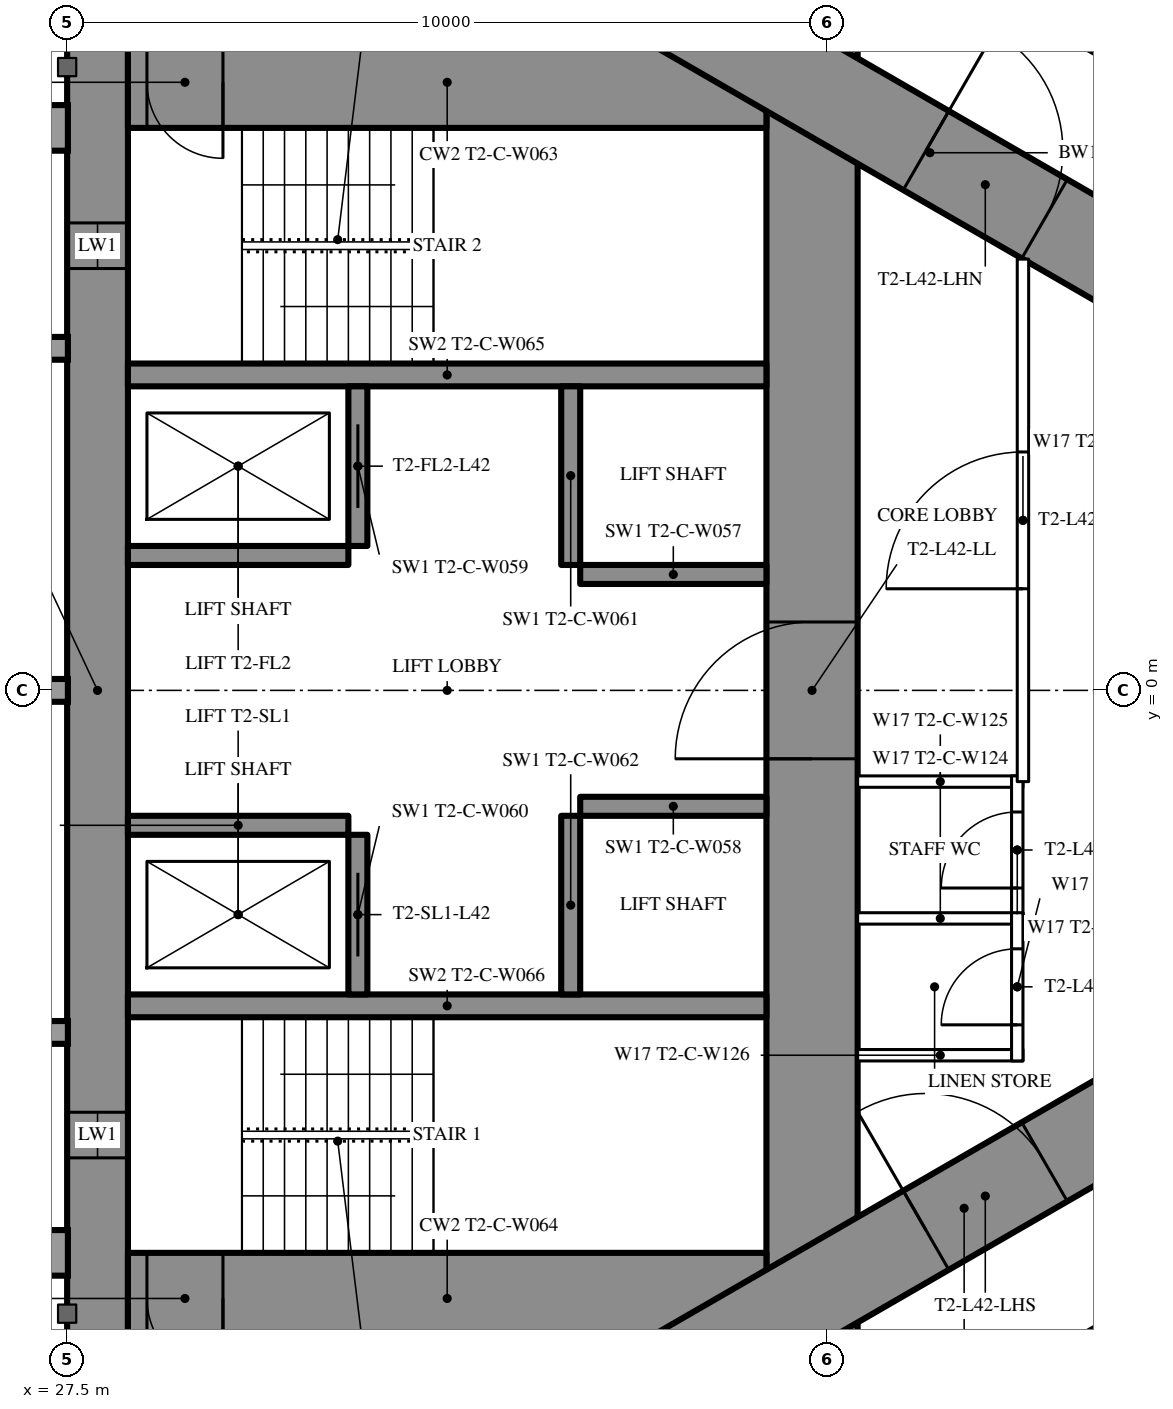
"""IFC4 building model, lengths in metres.
Left out: names, types, materials, properties, quantities, classifications, styles, units other than length and angle.
Written with IfcOpenShell. Run it as: python <this file> out.ifc"""

import sys

from ifc_helpers import new_model, si_unit, direction, frame, frame_2d, origin, place, context, subcontext, project, spatial, rectangle, extrude, element, fill, save


model = new_model("IFC4")
c1 = context("Model", 3, precision=1e-05, world=origin(), true_north=direction((0.0, 1.0)))
c2 = subcontext(c1, "Body", "Model", "MODEL_VIEW")
j1 = project(units=[si_unit("LENGTHUNIT", "METRE"), si_unit("PLANEANGLEUNIT", "RADIAN")], contexts=[c1])
p1 = place(None, origin())
s1 = spatial("IfcSite", under=j1, at=p1, CompositionType="ELEMENT")
p2 = place(p1, origin())
s2 = spatial("IfcBuilding", under=s1, at=p2, CompositionType="ELEMENT")
p3 = place(p2, frame((0.0, 0.0, 159.8)))
s3 = spatial("IfcBuildingStorey", under=s2, at=p3, CompositionType="ELEMENT", Elevation=159.8)
p4 = place(p3, frame((27.9, -8.6, 0.0), z_axis=(0.0, 0.0, 1.0), x_axis=(0.0, 1.0, 0.0)))
e1 = element("IfcWall", 1, at=p4, inside=s3, PredefinedType="SHEAR", context=c2, shape_type="SweptSolid", body=[
    extrude(rectangle(XDim=17.2, YDim=0.8, at=frame_2d((8.6, 0.0))), origin(), (0.0, 0.0, 1.0), 3.5),
])
p5 = place(p4, frame((2.45, 0.0, 0.6)))
e2 = element("IfcOpeningElement", 2, at=p5, cuts=e1, PredefinedType="OPENING", context=c2, shape_type="SweptSolid", body=[
    extrude(rectangle(XDim=0.6, YDim=2.1, at=frame_2d((0.3, 1.05))), frame((0.0, 0.41, 0.0), z_axis=(0.0, -1.0, 0.0), x_axis=(1.0, 0.0, 0.0)), (0.0, 0.0, 1.0), 0.82),
])
p6 = place(p4, frame((14.15, 0.0, 0.6)))
e3 = element("IfcOpeningElement", 3, at=p6, cuts=e1, PredefinedType="OPENING", context=c2, shape_type="SweptSolid", body=[
    extrude(rectangle(XDim=0.6, YDim=2.1, at=frame_2d((0.3, 1.05))), frame((0.0, 0.41, 0.0), z_axis=(0.0, -1.0, 0.0), x_axis=(1.0, 0.0, 0.0)), (0.0, 0.0, 1.0), 0.82),
])
p7 = place(p3, frame((37.3, -8.6, 0.0), z_axis=(0.0, 0.0, 1.0), x_axis=(0.0, 1.0, 0.0)))
e4 = element("IfcWall", 4, at=p7, inside=s3, PredefinedType="SHEAR", context=c2, shape_type="SweptSolid", body=[
    extrude(rectangle(XDim=17.2, YDim=1.2, at=frame_2d((8.6, 0.0))), origin(), (0.0, 0.0, 1.0), 3.5),
])
p8 = place(p7, frame((7.7, 0.0, 0.0)))
e5 = element("IfcOpeningElement", 5, at=p8, cuts=e4, PredefinedType="OPENING", context=c2, shape_type="SweptSolid", body=[
    extrude(rectangle(XDim=1.8, YDim=2.2, at=frame_2d((0.9, 1.1))), frame((0.0, 0.61, 0.0), z_axis=(0.0, -1.0, 0.0), x_axis=(1.0, 0.0, 0.0)), (0.0, 0.0, 1.0), 1.22),
])
p9 = place(p3, frame((28.3, -8.0, 0.0), z_axis=(0.0, 0.0, 1.0), x_axis=(1.0, 0.0, 0.0)))
e6 = element("IfcWall", 6, at=p9, inside=s3, PredefinedType="SHEAR", context=c2, shape_type="SweptSolid", body=[
    extrude(rectangle(XDim=8.4, YDim=1.2, at=frame_2d((4.2, 0.0))), origin(), (0.0, 0.0, 1.0), 3.5),
])
p10 = place(p9, frame((0.25, 0.0, 0.0)))
e7 = element("IfcOpeningElement", 7, at=p10, cuts=e6, PredefinedType="OPENING", context=c2, shape_type="SweptSolid", body=[
    extrude(rectangle(XDim=1.0, YDim=2.2, at=frame_2d((0.5, 1.1))), frame((0.0, 0.61, 0.0), z_axis=(0.0, -1.0, 0.0), x_axis=(1.0, 0.0, 0.0)), (0.0, 0.0, 1.0), 1.22),
])
p11 = place(p3, frame((28.3, 8.0, 0.0), z_axis=(0.0, 0.0, 1.0), x_axis=(1.0, 0.0, 0.0)))
e8 = element("IfcWall", 8, at=p11, inside=s3, PredefinedType="SHEAR", context=c2, shape_type="SweptSolid", body=[
    extrude(rectangle(XDim=8.4, YDim=1.2, at=frame_2d((4.2, 0.0))), origin(), (0.0, 0.0, 1.0), 3.5),
])
p12 = place(p11, frame((0.25, 0.0, 0.0)))
e9 = element("IfcOpeningElement", 9, at=p12, cuts=e8, PredefinedType="OPENING", context=c2, shape_type="SweptSolid", body=[
    extrude(rectangle(XDim=1.0, YDim=2.2, at=frame_2d((0.5, 1.1))), frame((0.0, 0.61, 0.0), z_axis=(0.0, -1.0, 0.0), x_axis=(1.0, 0.0, 0.0)), (0.0, 0.0, 1.0), 1.22),
])
for number, where, z_axis, x_axis in (
    (10, (28.3, -4.15, 0.0), (0.0, 0.0, 1.0), (1.0, 0.0, 0.0)),
    (11, (28.3, 4.15, 0.0), (0.0, 0.0, 1.0), (1.0, 0.0, 0.0)),
):
    element("IfcWall", number, at=place(p3, frame(where, z_axis=z_axis, x_axis=x_axis)), inside=s3, PredefinedType="SHEAR", context=c2, shape_type="SweptSolid", body=[
        extrude(rectangle(XDim=8.4, YDim=0.3, at=frame_2d((4.2, 0.0))), origin(), (0.0, 0.0, 1.0), 3.5),
    ])
p13 = place(p3, frame((31.325, -4.0, 0.0), z_axis=(0.0, 0.0, 1.0), x_axis=(0.0, 1.0, 0.0)))
e12 = element("IfcWall", 12, at=p13, inside=s3, PredefinedType="SHEAR", context=c2, shape_type="SweptSolid", body=[
    extrude(rectangle(XDim=2.1, YDim=0.25, at=frame_2d((1.05, 0.0))), origin(), (0.0, 0.0, 1.0), 3.5),
])
p14 = place(p13, frame((0.5, 0.0, 0.0)))
e13 = element("IfcOpeningElement", 13, at=p14, cuts=e12, PredefinedType="OPENING", context=c2, shape_type="SweptSolid", body=[
    extrude(rectangle(XDim=1.1, YDim=2.2, at=frame_2d((0.55, 1.1))), frame((0.0, 0.135, 0.0), z_axis=(0.0, -1.0, 0.0), x_axis=(1.0, 0.0, 0.0)), (0.0, 0.0, 1.0), 0.27),
])
p15 = place(p3, frame((34.125, -4.0, 0.0), z_axis=(0.0, 0.0, 1.0), x_axis=(0.0, 1.0, 0.0)))
e14 = element("IfcWall", 14, at=p15, inside=s3, PredefinedType="SHEAR", context=c2, shape_type="SweptSolid", body=[
    extrude(rectangle(XDim=2.35, YDim=0.25, at=frame_2d((1.175, 0.0))), origin(), (0.0, 0.0, 1.0), 3.5),
])
p16 = place(p3, frame((28.3, -1.775, 0.0), z_axis=(0.0, 0.0, 1.0), x_axis=(1.0, 0.0, 0.0)))
e15 = element("IfcWall", 15, at=p16, inside=s3, PredefinedType="SHEAR", context=c2, shape_type="SweptSolid", body=[
    extrude(rectangle(XDim=2.9, YDim=0.25, at=frame_2d((1.45, 0.0))), origin(), (0.0, 0.0, 1.0), 3.5),
])
p17 = place(p3, frame((34.25, -1.525, 0.0), z_axis=(0.0, 0.0, 1.0), x_axis=(1.0, 0.0, 0.0)))
e16 = element("IfcWall", 16, at=p17, inside=s3, PredefinedType="SHEAR", context=c2, shape_type="SweptSolid", body=[
    extrude(rectangle(XDim=2.45, YDim=0.25, at=frame_2d((1.225, 0.0))), origin(), (0.0, 0.0, 1.0), 3.5),
])
p18 = place(p3, frame((31.325, 1.9, 0.0), z_axis=(0.0, 0.0, 1.0), x_axis=(0.0, 1.0, 0.0)))
e17 = element("IfcWall", 17, at=p18, inside=s3, PredefinedType="SHEAR", context=c2, shape_type="SweptSolid", body=[
    extrude(rectangle(XDim=2.1, YDim=0.25, at=frame_2d((1.05, 0.0))), origin(), (0.0, 0.0, 1.0), 3.5),
])
p19 = place(p18, frame((0.5, 0.0, 0.0)))
e18 = element("IfcOpeningElement", 18, at=p19, cuts=e17, PredefinedType="OPENING", context=c2, shape_type="SweptSolid", body=[
    extrude(rectangle(XDim=1.1, YDim=2.2, at=frame_2d((0.55, 1.1))), frame((0.0, 0.135, 0.0), z_axis=(0.0, -1.0, 0.0), x_axis=(1.0, 0.0, 0.0)), (0.0, 0.0, 1.0), 0.27),
])
p20 = place(p3, frame((34.125, 1.65, 0.0), z_axis=(0.0, 0.0, 1.0), x_axis=(0.0, 1.0, 0.0)))
e19 = element("IfcWall", 19, at=p20, inside=s3, PredefinedType="SHEAR", context=c2, shape_type="SweptSolid", body=[
    extrude(rectangle(XDim=2.35, YDim=0.25, at=frame_2d((1.175, 0.0))), origin(), (0.0, 0.0, 1.0), 3.5),
])
p21 = place(p3, frame((28.3, 1.775, 0.0), z_axis=(0.0, 0.0, 1.0), x_axis=(1.0, 0.0, 0.0)))
e20 = element("IfcWall", 20, at=p21, inside=s3, PredefinedType="SHEAR", context=c2, shape_type="SweptSolid", body=[
    extrude(rectangle(XDim=2.9, YDim=0.25, at=frame_2d((1.45, 0.0))), origin(), (0.0, 0.0, 1.0), 3.5),
])
p22 = place(p3, frame((34.25, 1.525, 0.0), z_axis=(0.0, 0.0, 1.0), x_axis=(1.0, 0.0, 0.0)))
e21 = element("IfcWall", 21, at=p22, inside=s3, PredefinedType="SHEAR", context=c2, shape_type="SweptSolid", body=[
    extrude(rectangle(XDim=2.45, YDim=0.25, at=frame_2d((1.225, 0.0))), origin(), (0.0, 0.0, 1.0), 3.5),
])
p23 = place(p3, frame((27.2, -13.8, 0.0), z_axis=(0.0, 0.0, 1.0), x_axis=(0.866027159892, 0.499996958321, 0.0)))
e22 = element("IfcWall", 22, at=p23, inside=s3, PredefinedType="SHEAR", context=c2, shape_type="SweptSolid", body=[
    extrude(rectangle(XDim=27.947, YDim=1.2, at=frame_2d((13.973, 0.0))), origin(), (0.0, 0.0, 1.0), 3.5),
])
p24 = place(p23, frame((4.6, 0.0, 0.0)))
e23 = element("IfcOpeningElement", 23, at=p24, cuts=e22, PredefinedType="OPENING", context=c2, shape_type="SweptSolid", body=[
    extrude(rectangle(XDim=1.0, YDim=2.2, at=frame_2d((0.5, 1.1))), frame((0.0, 0.61, 0.0), z_axis=(0.0, -1.0, 0.0), x_axis=(1.0, 0.0, 0.0)), (0.0, 0.0, 1.0), 1.22),
])
p25 = place(p23, frame((13.395, 0.0, 0.0)))
e24 = element("IfcOpeningElement", 24, at=p25, cuts=e22, PredefinedType="OPENING", context=c2, shape_type="SweptSolid", body=[
    extrude(rectangle(XDim=1.8, YDim=2.2, at=frame_2d((0.9, 1.1))), frame((0.0, 0.61, 0.0), z_axis=(0.0, -1.0, 0.0), x_axis=(1.0, 0.0, 0.0)), (0.0, 0.0, 1.0), 1.22),
])
p26 = place(p3, frame((27.2, 13.8, 0.0), z_axis=(0.0, 0.0, 1.0), x_axis=(0.866024515034, -0.500001539357, 0.0)))
e25 = element("IfcWall", 25, at=p26, inside=s3, PredefinedType="SHEAR", context=c2, shape_type="SweptSolid", body=[
    extrude(rectangle(XDim=26.907, YDim=1.2, at=frame_2d((13.454, 0.0))), origin(), (0.0, 0.0, 1.0), 3.5),
])
p27 = place(p26, frame((4.6, 0.0, 0.0)))
e26 = element("IfcOpeningElement", 26, at=p27, cuts=e25, PredefinedType="OPENING", context=c2, shape_type="SweptSolid", body=[
    extrude(rectangle(XDim=1.0, YDim=2.2, at=frame_2d((0.5, 1.1))), frame((0.0, 0.61, 0.0), z_axis=(0.0, -1.0, 0.0), x_axis=(1.0, 0.0, 0.0)), (0.0, 0.0, 1.0), 1.22),
])
p28 = place(p26, frame((13.395, 0.0, 0.0)))
e27 = element("IfcOpeningElement", 27, at=p28, cuts=e25, PredefinedType="OPENING", context=c2, shape_type="SweptSolid", body=[
    extrude(rectangle(XDim=1.8, YDim=2.2, at=frame_2d((0.9, 1.1))), frame((0.0, 0.61, 0.0), z_axis=(0.0, -1.0, 0.0), x_axis=(1.0, 0.0, 0.0)), (0.0, 0.0, 1.0), 1.22),
])
p29 = place(p3, frame((36.834, 10.894, 0.0), z_axis=(0.0, 0.0, 1.0), x_axis=(0.866031655879, -0.499989170898, 0.0)))
e28 = element("IfcWall", 28, at=p29, inside=s3, PredefinedType="PARTITIONING", context=c2, shape_type="SweptSolid", body=[
    extrude(rectangle(XDim=11.41, YDim=0.2, at=frame_2d((5.705, 0.0))), origin(), (0.0, 0.0, 1.0), 3.25),
])
p30 = place(p29, frame((5.144, 0.0, 0.0)))
e29 = element("IfcOpeningElement", 29, at=p30, cuts=e28, PredefinedType="OPENING", context=c2, shape_type="SweptSolid", body=[
    extrude(rectangle(XDim=0.95, YDim=2.2, at=frame_2d((0.475, 1.1))), frame((0.0, 0.11, 0.0), z_axis=(0.0, -1.0, 0.0), x_axis=(1.0, 0.0, 0.0)), (0.0, 0.0, 1.0), 0.22),
])
p31 = place(p29, frame((3.161, 0.0, 0.0)))
e30 = element("IfcOpeningElement", 30, at=p31, cuts=e28, PredefinedType="OPENING", context=c2, shape_type="SweptSolid", body=[
    extrude(rectangle(XDim=0.95, YDim=2.2, at=frame_2d((0.475, 1.1))), frame((0.0, 0.11, 0.0), z_axis=(0.0, -1.0, 0.0), x_axis=(1.0, 0.0, 0.0)), (0.0, 0.0, 1.0), 0.22),
])
p32 = place(p29, frame((9.102, 0.0, 0.0)))
e31 = element("IfcOpeningElement", 31, at=p32, cuts=e28, PredefinedType="OPENING", context=c2, shape_type="SweptSolid", body=[
    extrude(rectangle(XDim=1.8, YDim=2.2, at=frame_2d((0.9, 1.1))), frame((0.0, 0.11, 0.0), z_axis=(0.0, -1.0, 0.0), x_axis=(1.0, 0.0, 0.0)), (0.0, 0.0, 1.0), 0.22),
])
p33 = place(p3, frame((40.741, -8.638, 0.0), z_axis=(0.0, 0.0, 1.0), x_axis=(0.866022967338, 0.500004220025, 0.0)))
e32 = element("IfcWall", 32, at=p33, inside=s3, PredefinedType="PARTITIONING", context=c2, shape_type="SweptSolid", body=[
    extrude(rectangle(XDim=17.276, YDim=0.2, at=frame_2d((8.638, 0.0))), origin(), (0.0, 0.0, 1.0), 3.25),
])
p34 = place(p33, frame((7.316, 0.0, 0.0)))
e33 = element("IfcOpeningElement", 33, at=p34, cuts=e32, PredefinedType="OPENING", context=c2, shape_type="SweptSolid", body=[
    extrude(rectangle(XDim=0.95, YDim=2.2, at=frame_2d((0.475, 1.1))), frame((0.0, 0.11, 0.0), z_axis=(0.0, -1.0, 0.0), x_axis=(1.0, 0.0, 0.0)), (0.0, 0.0, 1.0), 0.22),
])
p35 = place(p33, frame((11.366, 0.0, 0.0)))
e34 = element("IfcOpeningElement", 34, at=p35, cuts=e32, PredefinedType="OPENING", context=c2, shape_type="SweptSolid", body=[
    extrude(rectangle(XDim=0.95, YDim=2.2, at=frame_2d((0.475, 1.1))), frame((0.0, 0.11, 0.0), z_axis=(0.0, -1.0, 0.0), x_axis=(1.0, 0.0, 0.0)), (0.0, 0.0, 1.0), 0.22),
])
p36 = place(p33, frame((13.347, 0.0, 0.0)))
e35 = element("IfcOpeningElement", 35, at=p36, cuts=e32, PredefinedType="OPENING", context=c2, shape_type="SweptSolid", body=[
    extrude(rectangle(XDim=0.95, YDim=2.2, at=frame_2d((0.475, 1.1))), frame((0.0, 0.11, 0.0), z_axis=(0.0, -1.0, 0.0), x_axis=(1.0, 0.0, 0.0)), (0.0, 0.0, 1.0), 0.22),
])
for number, where, z_axis, x_axis in (
    (36, (37.9, -1.2, 0.0), (0.0, 0.0, 1.0), (1.0, 0.0, 0.0)),
    (37, (37.9, -3.0, 0.0), (0.0, 0.0, 1.0), (1.0, 0.0, 0.0)),
    (38, (37.9, -4.8, 0.0), (0.0, 0.0, 1.0), (1.0, 0.0, 0.0)),
):
    element("IfcWall", number, at=place(p3, frame(where, z_axis=z_axis, x_axis=x_axis)), inside=s3, PredefinedType="PARTITIONING", context=c2, shape_type="SweptSolid", body=[
        extrude(rectangle(XDim=2.175, YDim=0.15, at=frame_2d((1.087, 0.0))), origin(), (0.0, 0.0, 1.0), 3.25),
    ])
p37 = place(p3, frame((40.0, -3.075, 0.0), z_axis=(0.0, 0.0, 1.0), x_axis=(0.0, 1.0, 0.0)))
e39 = element("IfcWall", 39, at=p37, inside=s3, PredefinedType="PARTITIONING", context=c2, shape_type="SweptSolid", body=[
    extrude(rectangle(XDim=1.95, YDim=0.15, at=frame_2d((0.975, 0.0))), origin(), (0.0, 0.0, 1.0), 3.25),
])
p38 = place(p37, frame((0.475, 0.0, 0.0)))
e40 = element("IfcOpeningElement", 40, at=p38, cuts=e39, PredefinedType="OPENING", context=c2, shape_type="SweptSolid", body=[
    extrude(rectangle(XDim=1.0, YDim=2.2, at=frame_2d((0.5, 1.1))), frame((0.0, 0.085, 0.0), z_axis=(0.0, -1.0, 0.0), x_axis=(1.0, 0.0, 0.0)), (0.0, 0.0, 1.0), 0.17),
])
p39 = place(p3, frame((40.0, -4.875, 0.0), z_axis=(0.0, 0.0, 1.0), x_axis=(0.0, 1.0, 0.0)))
e41 = element("IfcWall", 41, at=p39, inside=s3, PredefinedType="PARTITIONING", context=c2, shape_type="SweptSolid", body=[
    extrude(rectangle(XDim=1.95, YDim=0.15, at=frame_2d((0.975, 0.0))), origin(), (0.0, 0.0, 1.0), 3.25),
])
p40 = place(p39, frame((0.475, 0.0, 0.0)))
e42 = element("IfcOpeningElement", 42, at=p40, cuts=e41, PredefinedType="OPENING", context=c2, shape_type="SweptSolid", body=[
    extrude(rectangle(XDim=1.0, YDim=2.2, at=frame_2d((0.5, 1.1))), frame((0.0, 0.085, 0.0), z_axis=(0.0, -1.0, 0.0), x_axis=(1.0, 0.0, 0.0)), (0.0, 0.0, 1.0), 0.17),
])
p41 = place(p3, frame((40.075, -1.2, 0.0), z_axis=(0.0, 0.0, 1.0), x_axis=(0.0, 1.0, 0.0)))
e43 = element("IfcWall", 43, at=p41, inside=s3, PredefinedType="PARTITIONING", context=c2, shape_type="SweptSolid", body=[
    extrude(rectangle(XDim=6.874, YDim=0.15, at=frame_2d((3.437, 0.0))), origin(), (0.0, 0.0, 1.0), 3.25),
])
p42 = place(p41, frame((2.537, 0.0, 0.0)))
e44 = element("IfcOpeningElement", 44, at=p42, cuts=e43, PredefinedType="OPENING", context=c2, shape_type="SweptSolid", body=[
    extrude(rectangle(XDim=1.8, YDim=2.2, at=frame_2d((0.9, 1.1))), frame((0.0, 0.085, 0.0), z_axis=(0.0, -1.0, 0.0), x_axis=(1.0, 0.0, 0.0)), (0.0, 0.0, 1.0), 0.17),
])
p43 = place(p38, origin())
e45 = element("IfcDoor", 45, at=p43, inside=s3, OperationType="SINGLE_SWING_LEFT", PredefinedType="DOOR", context=c2, shape_type="SweptSolid", body=[
    extrude(rectangle(XDim=1.0, YDim=2.2, at=frame_2d((0.5, 1.1))), frame((0.0, 0.025, 0.0), z_axis=(0.0, -1.0, 0.0), x_axis=(1.0, 0.0, 0.0)), (0.0, 0.0, 1.0), 0.05),
])
fill(e40, e45)
p44 = place(p40, origin())
e46 = element("IfcDoor", 46, at=p44, inside=s3, OperationType="SINGLE_SWING_LEFT", PredefinedType="DOOR", context=c2, shape_type="SweptSolid", body=[
    extrude(rectangle(XDim=1.0, YDim=2.2, at=frame_2d((0.5, 1.1))), frame((0.0, 0.025, 0.0), z_axis=(0.0, -1.0, 0.0), x_axis=(1.0, 0.0, 0.0)), (0.0, 0.0, 1.0), 0.05),
])
fill(e42, e46)
p45 = place(p42, origin())
e47 = element("IfcDoor", 47, at=p45, inside=s3, OperationType="DOUBLE_DOOR_SINGLE_SWING", PredefinedType="DOOR", context=c2, shape_type="SweptSolid", body=[
    extrude(rectangle(XDim=1.8, YDim=2.2, at=frame_2d((0.9, 1.1))), frame((0.0, 0.025, 0.0), z_axis=(0.0, -1.0, 0.0), x_axis=(1.0, 0.0, 0.0)), (0.0, 0.0, 1.0), 0.05),
])
fill(e44, e47)
p46 = place(p25, origin())
e48 = element("IfcDoor", 48, at=p46, inside=s3, OperationType="DOUBLE_DOOR_SINGLE_SWING", PredefinedType="DOOR", context=c2, shape_type="SweptSolid", body=[
    extrude(rectangle(XDim=1.8, YDim=2.2, at=frame_2d((0.9, 1.1))), frame((0.0, 0.025, 0.0), z_axis=(0.0, -1.0, 0.0), x_axis=(1.0, 0.0, 0.0)), (0.0, 0.0, 1.0), 0.05),
])
fill(e24, e48)
p47 = place(p28, origin())
e49 = element("IfcDoor", 49, at=p47, inside=s3, OperationType="DOUBLE_DOOR_SINGLE_SWING", PredefinedType="DOOR", context=c2, shape_type="SweptSolid", body=[
    extrude(rectangle(XDim=1.8, YDim=2.2, at=frame_2d((0.9, 1.1))), frame((0.0, 0.025, 0.0), z_axis=(0.0, -1.0, 0.0), x_axis=(1.0, 0.0, 0.0)), (0.0, 0.0, 1.0), 0.05),
])
fill(e27, e49)
p48 = place(p8, origin())
e50 = element("IfcDoor", 50, at=p48, inside=s3, OperationType="DOUBLE_DOOR_SINGLE_SWING", PredefinedType="DOOR", context=c2, shape_type="SweptSolid", body=[
    extrude(rectangle(XDim=1.8, YDim=2.2, at=frame_2d((0.9, 1.1))), frame((0.0, 0.025, 0.0), z_axis=(0.0, -1.0, 0.0), x_axis=(1.0, 0.0, 0.0)), (0.0, 0.0, 1.0), 0.05),
])
fill(e5, e50)
p49 = place(p10, origin())
e51 = element("IfcDoor", 51, at=p49, inside=s3, OperationType="SINGLE_SWING_RIGHT", PredefinedType="DOOR", context=c2, shape_type="SweptSolid", body=[
    extrude(rectangle(XDim=1.0, YDim=2.2, at=frame_2d((0.5, 1.1))), frame((0.0, 0.025, 0.0), z_axis=(0.0, -1.0, 0.0), x_axis=(1.0, 0.0, 0.0)), (0.0, 0.0, 1.0), 0.05),
])
fill(e7, e51)
p50 = place(p12, origin())
e52 = element("IfcDoor", 52, at=p50, inside=s3, OperationType="SINGLE_SWING_RIGHT", PredefinedType="DOOR", context=c2, shape_type="SweptSolid", body=[
    extrude(rectangle(XDim=1.0, YDim=2.2, at=frame_2d((0.5, 1.1))), frame((0.0, 0.025, 0.0), z_axis=(0.0, -1.0, 0.0), x_axis=(1.0, 0.0, 0.0)), (0.0, 0.0, 1.0), 0.05),
])
fill(e9, e52)
p51 = place(p14, origin())
e53 = element("IfcDoor", 53, at=p51, inside=s3, OperationType="SLIDING_TO_LEFT", PredefinedType="USERDEFINED", context=c2, shape_type="SweptSolid", body=[
    extrude(rectangle(XDim=1.1, YDim=2.2, at=frame_2d((0.55, 1.1))), frame((0.0, 0.025, 0.0), z_axis=(0.0, -1.0, 0.0), x_axis=(1.0, 0.0, 0.0)), (0.0, 0.0, 1.0), 0.05),
])
fill(e13, e53)
p52 = place(p19, origin())
e54 = element("IfcDoor", 54, at=p52, inside=s3, OperationType="SLIDING_TO_LEFT", PredefinedType="USERDEFINED", context=c2, shape_type="SweptSolid", body=[
    extrude(rectangle(XDim=1.1, YDim=2.2, at=frame_2d((0.55, 1.1))), frame((0.0, 0.025, 0.0), z_axis=(0.0, -1.0, 0.0), x_axis=(1.0, 0.0, 0.0)), (0.0, 0.0, 1.0), 0.05),
])
fill(e18, e54)
p53 = place(p5, origin())
e55 = element("IfcWindow", 55, at=p53, inside=s3, PartitioningType="SINGLE_PANEL", PredefinedType="WINDOW", context=c2, shape_type="SweptSolid", body=[
    extrude(rectangle(XDim=0.6, YDim=2.1, at=frame_2d((0.3, 1.05))), frame((0.0, 0.03, 0.0), z_axis=(0.0, -1.0, 0.0), x_axis=(1.0, 0.0, 0.0)), (0.0, 0.0, 1.0), 0.06),
])
fill(e2, e55)
p54 = place(p6, origin())
e56 = element("IfcWindow", 56, at=p54, inside=s3, PartitioningType="SINGLE_PANEL", PredefinedType="WINDOW", context=c2, shape_type="SweptSolid", body=[
    extrude(rectangle(XDim=0.6, YDim=2.1, at=frame_2d((0.3, 1.05))), frame((0.0, 0.03, 0.0), z_axis=(0.0, -1.0, 0.0), x_axis=(1.0, 0.0, 0.0)), (0.0, 0.0, 1.0), 0.06),
])
fill(e3, e56)
save(model, sys.argv[1])
